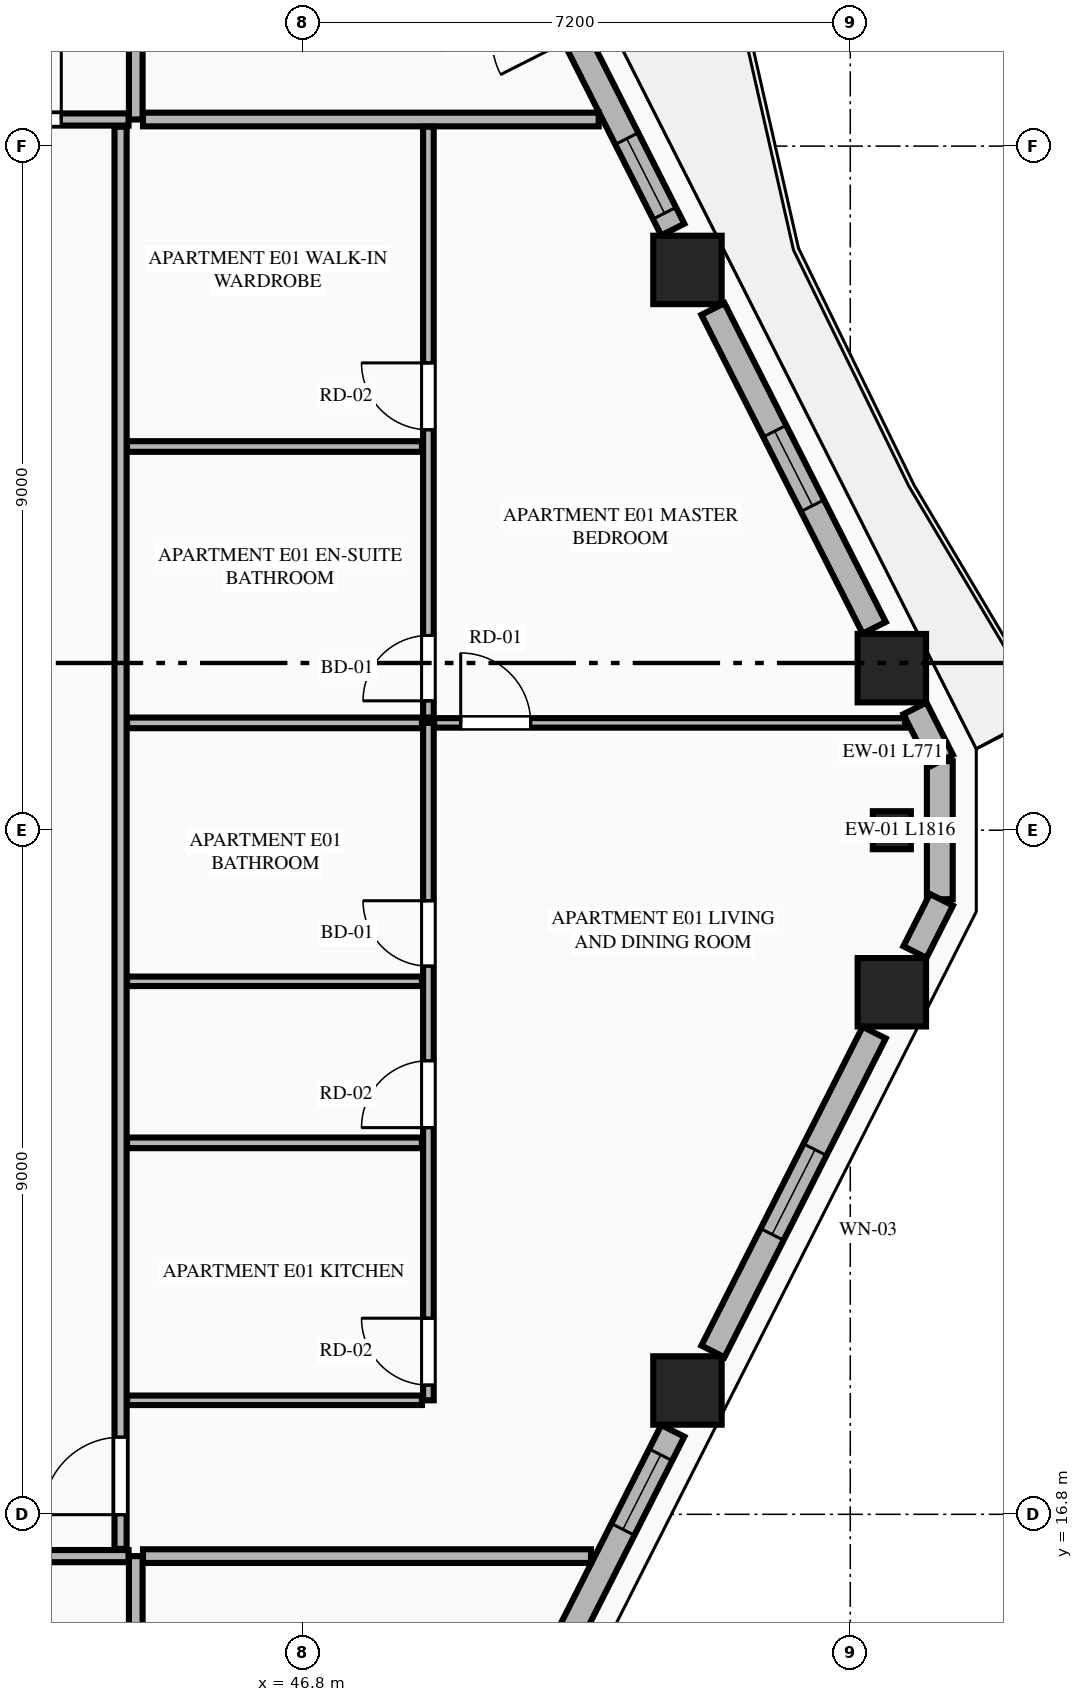
"""IFC4 building model, lengths in metres.
Left out: names, types, materials, properties, quantities, classifications, styles, units other than length and angle.
Written with IfcOpenShell. Run it as: python <this file> out.ifc"""

import sys

from ifc_helpers import new_model, si_unit, direction, frame, frame_2d, origin, origin_2d, place, context, subcontext, project, spatial, rectangle, extrude, element, fill, save


model = new_model("IFC4")
c1 = context("Model", 3, precision=1e-05, world=origin(), true_north=direction((0.0, 1.0)))
c2 = subcontext(c1, "Body", "Model", "MODEL_VIEW")
j1 = project(units=[si_unit("LENGTHUNIT", "METRE"), si_unit("PLANEANGLEUNIT", "RADIAN")], contexts=[c1])
p1 = place(None, origin())
s1 = spatial("IfcSite", under=j1, at=p1, CompositionType="ELEMENT")
p2 = place(p1, origin())
s2 = spatial("IfcBuilding", under=s1, at=p2, CompositionType="ELEMENT")
p3 = place(p2, frame((0.0, 0.0, 196.75)))
s3 = spatial("IfcBuildingStorey", under=s2, at=p3, CompositionType="ELEMENT", Elevation=196.75)
for number, where, z_axis, x_axis in (
    (1, (51.858, 18.429, 0.0), (0.0, 0.0, 1.0), (1.0, 0.0, 0.0)),
    (2, (54.547, 23.668, 0.0), (0.0, 0.0, 1.0), (1.0, 0.0, 0.0)),
    (3, (54.547, 27.932, 0.0), (0.0, 0.0, 1.0), (1.0, 0.0, 0.0)),
    (4, (51.858, 33.171, 0.0), (0.0, 0.0, 1.0), (1.0, 0.0, 0.0)),
):
    element("IfcColumn", number, at=place(p3, frame(where, z_axis=z_axis, x_axis=x_axis)), inside=s3, PredefinedType="COLUMN", context=c2, shape_type="SweptSolid", body=[
        extrude(rectangle(XDim=0.9, YDim=0.9, at=origin_2d()), origin(), (0.0, 0.0, 1.0), 3.55),
    ])
p4 = place(p3, frame((54.547, 25.8, 0.0), z_axis=(0.0, 0.0, 1.0), x_axis=(0.0, 1.0, 0.0)))
e5 = element("IfcColumn", 5, at=p4, inside=s3, PredefinedType="PILASTER", context=c2, shape_type="SweptSolid", body=[
    extrude(rectangle(XDim=0.5, YDim=0.35, at=origin_2d()), origin(), (0.0, 0.0, 1.0), 3.55),
])
p5 = place(p3, frame((55.178, 24.892, 0.0), z_axis=(0.0, 0.0, 1.0), x_axis=(0.0, 1.0, 0.0)))
e6 = element("IfcWall", 6, at=p5, inside=s3, PredefinedType="STANDARD", context=c2, shape_type="SweptSolid", body=[
    extrude(rectangle(XDim=1.816, YDim=0.34, at=frame_2d((0.908, 0.0))), origin(), (0.0, 0.0, 1.0), 3.35),
])
p6 = place(p3, frame((49.448, 13.517, 0.0), z_axis=(0.0, 0.0, 1.0), x_axis=(0.451544279509, 0.892248711763, 0.0)))
e7 = element("IfcWall", 7, at=p6, inside=s3, PredefinedType="STANDARD", context=c2, shape_type="SweptSolid", body=[
    extrude(rectangle(XDim=4.91, YDim=0.34, at=frame_2d((2.455, 0.0))), origin(), (0.0, 0.0, 1.0), 2.883),
])
p7 = place(p6, frame((0.851, 0.0, 0.75)))
e8 = element("IfcOpeningElement", 8, at=p7, cuts=e7, PredefinedType="OPENING", context=c2, shape_type="SweptSolid", body=[
    extrude(rectangle(XDim=1.1, YDim=1.983, at=frame_2d((0.55, 0.991))), frame((0.0, 0.18, 0.0), z_axis=(0.0, -1.0, 0.0), x_axis=(1.0, 0.0, 0.0)), (0.0, 0.0, 1.0), 0.36),
])
p8 = place(p6, frame((3.457, 0.0, 0.75)))
e9 = element("IfcOpeningElement", 9, at=p8, cuts=e7, PredefinedType="OPENING", context=c2, shape_type="SweptSolid", body=[
    extrude(rectangle(XDim=1.1, YDim=1.983, at=frame_2d((0.55, 0.991))), frame((0.0, 0.18, 0.0), z_axis=(0.0, -1.0, 0.0), x_axis=(1.0, 0.0, 0.0)), (0.0, 0.0, 1.0), 0.36),
])
p9 = place(p3, frame((52.193, 18.943, 0.0), z_axis=(0.0, 0.0, 1.0), x_axis=(0.451447222193, 0.892297823361, 0.0)))
e10 = element("IfcWall", 10, at=p9, inside=s3, PredefinedType="STANDARD", context=c2, shape_type="SweptSolid", body=[
    extrude(rectangle(XDim=4.7, YDim=0.34, at=frame_2d((2.35, 0.0))), origin(), (0.0, 0.0, 1.0), 2.883),
])
p10 = place(p9, frame((1.725, 0.0, 0.75)))
e11 = element("IfcOpeningElement", 11, at=p10, cuts=e10, PredefinedType="OPENING", context=c2, shape_type="SweptSolid", body=[
    extrude(rectangle(XDim=1.25, YDim=1.95, at=frame_2d((0.625, 0.975))), frame((0.0, 0.18, 0.0), z_axis=(0.0, -1.0, 0.0), x_axis=(1.0, 0.0, 0.0)), (0.0, 0.0, 1.0), 0.36),
])
for number, where, z_axis, x_axis in (
    (12, (54.851, 24.197, 0.0), (0.0, 0.0, 1.0), (0.451, 0.892, 0.0)),
    (13, (55.199, 26.715, 0.0), (0.0, 0.0, 1.0), (-0.451, 0.892, 0.0)),
):
    element("IfcWall", number, at=place(p3, frame(where, z_axis=z_axis, x_axis=x_axis)), inside=s3, PredefinedType="STANDARD", context=c2, shape_type="SweptSolid", body=[
        extrude(rectangle(XDim=0.771, YDim=0.34, at=frame_2d((0.385, 0.0))), origin(), (0.0, 0.0, 1.0), 3.35),
    ])
p11 = place(p3, frame((54.315, 28.463, 0.0), z_axis=(0.0, 0.0, 1.0), x_axis=(-0.451426298588, 0.892308409096, 0.0)))
e14 = element("IfcWall", 14, at=p11, inside=s3, PredefinedType="STANDARD", context=c2, shape_type="SweptSolid", body=[
    extrude(rectangle(XDim=4.7, YDim=0.34, at=frame_2d((2.35, 0.0))), origin(), (0.0, 0.0, 1.0), 2.883),
])
p12 = place(p11, frame((1.8, 0.0, 0.75)))
e15 = element("IfcOpeningElement", 15, at=p12, cuts=e14, PredefinedType="OPENING", context=c2, shape_type="SweptSolid", body=[
    extrude(rectangle(XDim=1.1, YDim=1.983, at=frame_2d((0.55, 0.991))), frame((0.0, 0.18, 0.0), z_axis=(0.0, -1.0, 0.0), x_axis=(1.0, 0.0, 0.0)), (0.0, 0.0, 1.0), 0.36),
])
p13 = place(p3, frame((51.665, 33.702, 0.0), z_axis=(0.0, 0.0, 1.0), x_axis=(-0.451524246964, 0.89225884944, 0.0)))
e16 = element("IfcWall", 16, at=p13, inside=s3, PredefinedType="STANDARD", context=c2, shape_type="SweptSolid", body=[
    extrude(rectangle(XDim=4.91, YDim=0.34, at=frame_2d((2.455, 0.0))), origin(), (0.0, 0.0, 1.0), 2.883),
])
p14 = place(p13, frame((2.842, 0.0, 0.0)))
e17 = element("IfcOpeningElement", 17, at=p14, cuts=e16, PredefinedType="OPENING", context=c2, shape_type="SweptSolid", body=[
    extrude(rectangle(XDim=1.1, YDim=2.25, at=frame_2d((0.55, 1.125))), frame((0.0, 0.18, 0.0), z_axis=(0.0, -1.0, 0.0), x_axis=(1.0, 0.0, 0.0)), (0.0, 0.0, 1.0), 0.36),
])
p15 = place(p13, frame((0.241, 0.0, 0.75)))
e18 = element("IfcOpeningElement", 18, at=p15, cuts=e16, PredefinedType="OPENING", context=c2, shape_type="SweptSolid", body=[
    extrude(rectangle(XDim=1.1, YDim=1.983, at=frame_2d((0.55, 0.991))), frame((0.0, 0.18, 0.0), z_axis=(0.0, -1.0, 0.0), x_axis=(1.0, 0.0, 0.0)), (0.0, 0.0, 1.0), 0.36),
])
p16 = place(p3, frame((44.6, 5.968, 0.0), z_axis=(0.0, 0.0, 1.0), x_axis=(0.0, 1.0, 0.0)))
e19 = element("IfcWall", 19, at=p16, inside=s3, PredefinedType="PARTITIONING", context=c2, shape_type="SweptSolid", body=[
    extrude(rectangle(XDim=10.282, YDim=0.18, at=frame_2d((5.141, 0.0))), origin(), (0.0, 0.0, 1.0), 3.35),
])
p17 = place(p3, frame((20.295, 16.25, 0.0), z_axis=(0.0, 0.0, 1.0), x_axis=(1.0, 0.0, 0.0)))
e20 = element("IfcWall", 20, at=p17, inside=s3, PredefinedType="PARTITIONING", context=c2, shape_type="SweptSolid", body=[
    extrude(rectangle(XDim=24.21, YDim=0.16, at=frame_2d((12.105, 0.0))), origin(), (0.0, 0.0, 1.0), 3.35),
])
p18 = place(p17, frame((22.005, 0.0, 0.0)))
e21 = element("IfcOpeningElement", 21, at=p18, cuts=e20, PredefinedType="OPENING", context=c2, shape_type="SweptSolid", body=[
    extrude(rectangle(XDim=1.02, YDim=2.25, at=frame_2d((0.51, 1.125))), frame((0.0, 0.09, 0.0), z_axis=(0.0, -1.0, 0.0), x_axis=(1.0, 0.0, 0.0)), (0.0, 0.0, 1.0), 0.18),
])
p19 = place(p3, frame((44.6, 35.15, 0.0), z_axis=(0.0, 0.0, 1.0), x_axis=(0.0, 1.0, 0.0)))
e22 = element("IfcWall", 22, at=p19, inside=s3, PredefinedType="PARTITIONING", context=c2, shape_type="SweptSolid", body=[
    extrude(rectangle(XDim=10.482, YDim=0.18, at=frame_2d((5.241, 0.0))), origin(), (0.0, 0.0, 1.0), 3.35),
])
p20 = place(p3, frame((28.952, 35.15, 0.0), z_axis=(0.0, 0.0, 1.0), x_axis=(1.0, 0.0, 0.0)))
e23 = element("IfcWall", 23, at=p20, inside=s3, PredefinedType="PARTITIONING", context=c2, shape_type="SweptSolid", body=[
    extrude(rectangle(XDim=15.553, YDim=0.16, at=frame_2d((7.776, 0.0))), origin(), (0.0, 0.0, 1.0), 3.35),
])
p21 = place(p20, frame((13.648, 0.0, 0.0)))
e24 = element("IfcOpeningElement", 24, at=p21, cuts=e23, PredefinedType="OPENING", context=c2, shape_type="SweptSolid", body=[
    extrude(rectangle(XDim=1.02, YDim=2.25, at=frame_2d((0.51, 1.125))), frame((0.0, 0.09, 0.0), z_axis=(0.0, -1.0, 0.0), x_axis=(1.0, 0.0, 0.0)), (0.0, 0.0, 1.0), 0.18),
])
p22 = place(p3, frame((44.695, 16.25, 0.0), z_axis=(0.0, 0.0, 1.0), x_axis=(1.0, 0.0, 0.0)))
e25 = element("IfcWall", 25, at=p22, inside=s3, PredefinedType="PARTITIONING", context=c2, shape_type="SweptSolid", body=[
    extrude(rectangle(XDim=5.894, YDim=0.18, at=frame_2d((2.947, 0.0))), origin(), (0.0, 0.0, 1.0), 3.35),
])
p23 = place(p3, frame((44.695, 35.15, 0.0), z_axis=(0.0, 0.0, 1.0), x_axis=(1.0, 0.0, 0.0)))
e26 = element("IfcWall", 26, at=p23, inside=s3, PredefinedType="PARTITIONING", context=c2, shape_type="SweptSolid", body=[
    extrude(rectangle(XDim=5.995, YDim=0.18, at=frame_2d((2.998, 0.0))), origin(), (0.0, 0.0, 1.0), 3.35),
])
p24 = place(p3, frame((44.4, 16.345, 0.0), z_axis=(0.0, 0.0, 1.0), x_axis=(0.0, 1.0, 0.0)))
e27 = element("IfcWall", 27, at=p24, inside=s3, PredefinedType="PARTITIONING", context=c2, shape_type="SweptSolid", body=[
    extrude(rectangle(XDim=18.71, YDim=0.16, at=frame_2d((9.355, 0.0))), origin(), (0.0, 0.0, 1.0), 3.35),
])
p25 = place(p24, frame((0.45, 0.0, 0.0)))
e28 = element("IfcOpeningElement", 28, at=p25, cuts=e27, PredefinedType="OPENING", context=c2, shape_type="SweptSolid", body=[
    extrude(rectangle(XDim=1.02, YDim=2.25, at=frame_2d((0.51, 1.125))), frame((0.0, 0.09, 0.0), z_axis=(0.0, -1.0, 0.0), x_axis=(1.0, 0.0, 0.0)), (0.0, 0.0, 1.0), 0.18),
])
p26 = place(p3, frame((44.485, 18.3, 0.0), z_axis=(0.0, 0.0, 1.0), x_axis=(1.0, 0.0, 0.0)))
e29 = element("IfcWall", 29, at=p26, inside=s3, PredefinedType="PARTITIONING", context=c2, shape_type="SweptSolid", body=[
    extrude(rectangle(XDim=3.88, YDim=0.125, at=frame_2d((1.94, 0.0))), origin(), (0.0, 0.0, 1.0), 2.807),
])
p27 = place(p3, frame((48.45, 18.3, 0.0), z_axis=(0.0, 0.0, 1.0), x_axis=(0.0, 1.0, 0.0)))
e30 = element("IfcWall", 30, at=p27, inside=s3, PredefinedType="PLUMBINGWALL", context=c2, shape_type="SweptSolid", body=[
    extrude(rectangle(XDim=8.912, YDim=0.14, at=frame_2d((4.456, 0.0))), origin(), (0.0, 0.0, 1.0), 3.35),
])
p28 = place(p27, frame((0.2, 0.0, 0.0)))
e31 = element("IfcOpeningElement", 31, at=p28, cuts=e30, PredefinedType="OPENING", context=c2, shape_type="SweptSolid", body=[
    extrude(rectangle(XDim=0.88, YDim=2.15, at=frame_2d((0.44, 1.075))), frame((0.0, 0.08, 0.0), z_axis=(0.0, -1.0, 0.0), x_axis=(1.0, 0.0, 0.0)), (0.0, 0.0, 1.0), 0.16),
])
p29 = place(p27, frame((3.587, 0.0, 0.0)))
e32 = element("IfcOpeningElement", 32, at=p29, cuts=e30, PredefinedType="OPENING", context=c2, shape_type="SweptSolid", body=[
    extrude(rectangle(XDim=0.88, YDim=2.15, at=frame_2d((0.44, 1.075))), frame((0.0, 0.08, 0.0), z_axis=(0.0, -1.0, 0.0), x_axis=(1.0, 0.0, 0.0)), (0.0, 0.0, 1.0), 0.16),
])
p30 = place(p27, frame((5.712, 0.0, 0.0)))
e33 = element("IfcOpeningElement", 33, at=p30, cuts=e30, PredefinedType="OPENING", context=c2, shape_type="SweptSolid", body=[
    extrude(rectangle(XDim=0.86, YDim=2.1, at=frame_2d((0.43, 1.05))), frame((0.0, 0.08, 0.0), z_axis=(0.0, -1.0, 0.0), x_axis=(1.0, 0.0, 0.0)), (0.0, 0.0, 1.0), 0.16),
])
p31 = place(p3, frame((48.45, 27.282, 0.0), z_axis=(0.0, 0.0, 1.0), x_axis=(0.0, 1.0, 0.0)))
e34 = element("IfcWall", 34, at=p31, inside=s3, PredefinedType="PLUMBINGWALL", context=c2, shape_type="SweptSolid", body=[
    extrude(rectangle(XDim=7.773, YDim=0.14, at=frame_2d((3.886, 0.0))), origin(), (0.0, 0.0, 1.0), 3.35),
])
p32 = place(p31, frame((0.22, 0.0, 0.0)))
e35 = element("IfcOpeningElement", 35, at=p32, cuts=e34, PredefinedType="OPENING", context=c2, shape_type="SweptSolid", body=[
    extrude(rectangle(XDim=0.86, YDim=2.1, at=frame_2d((0.43, 1.05))), frame((0.0, 0.08, 0.0), z_axis=(0.0, -1.0, 0.0), x_axis=(1.0, 0.0, 0.0)), (0.0, 0.0, 1.0), 0.16),
])
p33 = place(p31, frame((3.786, 0.0, 0.0)))
e36 = element("IfcOpeningElement", 36, at=p33, cuts=e34, PredefinedType="OPENING", context=c2, shape_type="SweptSolid", body=[
    extrude(rectangle(XDim=0.88, YDim=2.15, at=frame_2d((0.44, 1.075))), frame((0.0, 0.08, 0.0), z_axis=(0.0, -1.0, 0.0), x_axis=(1.0, 0.0, 0.0)), (0.0, 0.0, 1.0), 0.16),
])
p34 = place(p3, frame((44.485, 27.212, 0.0), z_axis=(0.0, 0.0, 1.0), x_axis=(1.0, 0.0, 0.0)))
e37 = element("IfcWall", 37, at=p34, inside=s3, PredefinedType="PLUMBINGWALL", context=c2, shape_type="SweptSolid", body=[
    extrude(rectangle(XDim=3.88, YDim=0.14, at=frame_2d((1.94, 0.0))), origin(), (0.0, 0.0, 1.0), 3.35),
])
p35 = place(p3, frame((48.525, 27.212, 0.0), z_axis=(0.0, 0.0, 1.0), x_axis=(1.0, 0.0, 0.0)))
e38 = element("IfcWall", 38, at=p35, inside=s3, PredefinedType="PARTITIONING", context=c2, shape_type="SweptSolid", body=[
    extrude(rectangle(XDim=6.196, YDim=0.125, at=frame_2d((3.098, 0.0))), origin(), (0.0, 0.0, 1.0), 3.35),
])
p36 = place(p35, frame((0.35, 0.0, 0.0)))
e39 = element("IfcOpeningElement", 39, at=p36, cuts=e38, PredefinedType="OPENING", context=c2, shape_type="SweptSolid", body=[
    extrude(rectangle(XDim=0.92, YDim=2.15, at=frame_2d((0.46, 1.075))), frame((0.0, 0.073, 0.0), z_axis=(0.0, -1.0, 0.0), x_axis=(1.0, 0.0, 0.0)), (0.0, 0.0, 1.0), 0.145),
])
p37 = place(p3, frame((44.485, 21.687, 0.0), z_axis=(0.0, 0.0, 1.0), x_axis=(1.0, 0.0, 0.0)))
e40 = element("IfcWall", 40, at=p37, inside=s3, PredefinedType="PLUMBINGWALL", context=c2, shape_type="SweptSolid", body=[
    extrude(rectangle(XDim=3.88, YDim=0.14, at=frame_2d((1.94, 0.0))), origin(), (0.0, 0.0, 1.0), 3.35),
])
p38 = place(p3, frame((44.485, 23.812, 0.0), z_axis=(0.0, 0.0, 1.0), x_axis=(1.0, 0.0, 0.0)))
e41 = element("IfcWall", 41, at=p38, inside=s3, PredefinedType="PARTITIONING", context=c2, shape_type="SweptSolid", body=[
    extrude(rectangle(XDim=3.88, YDim=0.125, at=frame_2d((1.94, 0.0))), origin(), (0.0, 0.0, 1.0), 3.35),
])
p39 = place(p3, frame((44.485, 30.848, 0.0), z_axis=(0.0, 0.0, 1.0), x_axis=(1.0, 0.0, 0.0)))
e42 = element("IfcWall", 42, at=p39, inside=s3, PredefinedType="PLUMBINGWALL", context=c2, shape_type="SweptSolid", body=[
    extrude(rectangle(XDim=3.88, YDim=0.14, at=frame_2d((1.94, 0.0))), origin(), (0.0, 0.0, 1.0), 3.35),
])
p40 = place(p10, origin())
e43 = element("IfcWindow", 43, at=p40, inside=s3, PartitioningType="SINGLE_PANEL", PredefinedType="WINDOW", context=c2, shape_type="SweptSolid", body=[
    extrude(rectangle(XDim=1.25, YDim=1.95, at=frame_2d((0.625, 0.975))), frame((0.0, 0.03, 0.0), z_axis=(0.0, -1.0, 0.0), x_axis=(1.0, 0.0, 0.0)), (0.0, 0.0, 1.0), 0.06),
])
fill(e11, e43)
p41 = place(p12, origin())
e44 = element("IfcWindow", 44, at=p41, inside=s3, PartitioningType="SINGLE_PANEL", PredefinedType="WINDOW", context=c2, shape_type="SweptSolid", body=[
    extrude(rectangle(XDim=1.1, YDim=1.983, at=frame_2d((0.55, 0.991))), frame((0.0, 0.03, 0.0), z_axis=(0.0, -1.0, 0.0), x_axis=(1.0, 0.0, 0.0)), (0.0, 0.0, 1.0), 0.06),
])
fill(e15, e44)
p42 = place(p21, origin())
e45 = element("IfcDoor", 45, at=p42, inside=s3, OperationType="SINGLE_SWING_RIGHT", PredefinedType="DOOR", context=c2, shape_type="SweptSolid", body=[
    extrude(rectangle(XDim=1.02, YDim=2.25, at=frame_2d((0.51, 1.125))), frame((0.0, 0.025, 0.0), z_axis=(0.0, -1.0, 0.0), x_axis=(1.0, 0.0, 0.0)), (0.0, 0.0, 1.0), 0.05),
])
fill(e24, e45)
p43 = place(p28, origin())
e46 = element("IfcDoor", 46, at=p43, inside=s3, OperationType="SINGLE_SWING_RIGHT", PredefinedType="DOOR", context=c2, shape_type="SweptSolid", body=[
    extrude(rectangle(XDim=0.88, YDim=2.15, at=frame_2d((0.44, 1.075))), frame((0.0, 0.025, 0.0), z_axis=(0.0, -1.0, 0.0), x_axis=(1.0, 0.0, 0.0)), (0.0, 0.0, 1.0), 0.05),
])
fill(e31, e46)
p44 = place(p29, origin())
e47 = element("IfcDoor", 47, at=p44, inside=s3, OperationType="SINGLE_SWING_LEFT", PredefinedType="DOOR", context=c2, shape_type="SweptSolid", body=[
    extrude(rectangle(XDim=0.88, YDim=2.15, at=frame_2d((0.44, 1.075))), frame((0.0, 0.025, 0.0), z_axis=(0.0, -1.0, 0.0), x_axis=(1.0, 0.0, 0.0)), (0.0, 0.0, 1.0), 0.05),
])
fill(e32, e47)
p45 = place(p30, origin())
e48 = element("IfcDoor", 48, at=p45, inside=s3, OperationType="SINGLE_SWING_RIGHT", PredefinedType="DOOR", context=c2, shape_type="SweptSolid", body=[
    extrude(rectangle(XDim=0.86, YDim=2.1, at=frame_2d((0.43, 1.05))), frame((0.0, 0.025, 0.0), z_axis=(0.0, -1.0, 0.0), x_axis=(1.0, 0.0, 0.0)), (0.0, 0.0, 1.0), 0.05),
])
fill(e33, e48)
p46 = place(p32, origin())
e49 = element("IfcDoor", 49, at=p46, inside=s3, OperationType="SINGLE_SWING_LEFT", PredefinedType="DOOR", context=c2, shape_type="SweptSolid", body=[
    extrude(rectangle(XDim=0.86, YDim=2.1, at=frame_2d((0.43, 1.05))), frame((0.0, 0.025, 0.0), z_axis=(0.0, -1.0, 0.0), x_axis=(1.0, 0.0, 0.0)), (0.0, 0.0, 1.0), 0.05),
])
fill(e35, e49)
p47 = place(p33, origin())
e50 = element("IfcDoor", 50, at=p47, inside=s3, OperationType="SINGLE_SWING_RIGHT", PredefinedType="DOOR", context=c2, shape_type="SweptSolid", body=[
    extrude(rectangle(XDim=0.88, YDim=2.15, at=frame_2d((0.44, 1.075))), frame((0.0, 0.025, 0.0), z_axis=(0.0, -1.0, 0.0), x_axis=(1.0, 0.0, 0.0)), (0.0, 0.0, 1.0), 0.05),
])
fill(e36, e50)
p48 = place(p25, origin())
e51 = element("IfcDoor", 51, at=p48, inside=s3, OperationType="SINGLE_SWING_LEFT", PredefinedType="DOOR", context=c2, shape_type="SweptSolid", body=[
    extrude(rectangle(XDim=1.02, YDim=2.25, at=frame_2d((0.51, 1.125))), frame((0.0, 0.025, 0.0), z_axis=(0.0, -1.0, 0.0), x_axis=(1.0, 0.0, 0.0)), (0.0, 0.0, 1.0), 0.05),
])
fill(e28, e51)
p49 = place(p36, origin())
e52 = element("IfcDoor", 52, at=p49, inside=s3, OperationType="SINGLE_SWING_LEFT", PredefinedType="DOOR", context=c2, shape_type="SweptSolid", body=[
    extrude(rectangle(XDim=0.92, YDim=2.15, at=frame_2d((0.46, 1.075))), frame((0.0, 0.025, 0.0), z_axis=(0.0, -1.0, 0.0), x_axis=(1.0, 0.0, 0.0)), (0.0, 0.0, 1.0), 0.05),
])
fill(e39, e52)
p50 = place(p8, origin())
e53 = element("IfcWindow", 53, at=p50, inside=s3, PartitioningType="SINGLE_PANEL", PredefinedType="WINDOW", context=c2, shape_type="SweptSolid", body=[
    extrude(rectangle(XDim=1.1, YDim=1.983, at=frame_2d((0.55, 0.991))), frame((0.0, 0.03, 0.0), z_axis=(0.0, -1.0, 0.0), x_axis=(1.0, 0.0, 0.0)), (0.0, 0.0, 1.0), 0.06),
])
fill(e9, e53)
p51 = place(p15, origin())
e54 = element("IfcWindow", 54, at=p51, inside=s3, PartitioningType="SINGLE_PANEL", PredefinedType="WINDOW", context=c2, shape_type="SweptSolid", body=[
    extrude(rectangle(XDim=1.1, YDim=1.983, at=frame_2d((0.55, 0.991))), frame((0.0, 0.03, 0.0), z_axis=(0.0, -1.0, 0.0), x_axis=(1.0, 0.0, 0.0)), (0.0, 0.0, 1.0), 0.06),
])
fill(e18, e54)
save(model, sys.argv[1])
